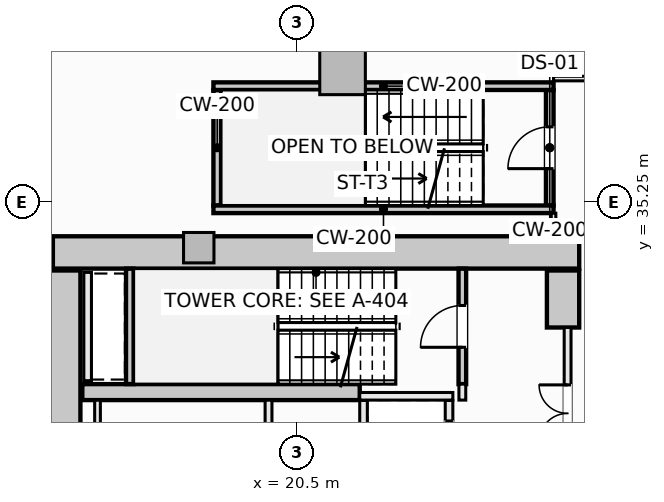
"""IFC4 building model, lengths in metres.
Left out: names, types, materials, properties, quantities, classifications, styles, units other than length and angle.
Written with IfcOpenShell. Run it as: python <this file> out.ifc"""

import sys

from ifc_helpers import new_model, si_unit, direction, frame, frame_2d, origin, origin_2d, place, context, subcontext, project, spatial, rectangle, extrude, element, fill, save


model = new_model("IFC4")
c1 = context("Model", 3, precision=1e-05, world=origin(), true_north=direction((0.0, 1.0)))
c2 = subcontext(c1, "Body", "Model", "MODEL_VIEW")
j1 = project(units=[si_unit("LENGTHUNIT", "METRE"), si_unit("PLANEANGLEUNIT", "RADIAN")], contexts=[c1])
p1 = place(None, origin())
s1 = spatial("IfcSite", under=j1, at=p1, CompositionType="ELEMENT")
p2 = place(p1, origin())
s2 = spatial("IfcBuilding", under=s1, at=p2, CompositionType="ELEMENT")
p3 = place(p2, frame((0.0, 0.0, 26.5)))
s3 = spatial("IfcBuildingStorey", under=s2, at=p3, CompositionType="ELEMENT", Elevation=26.5)
p4 = place(p3, frame((14.075, 33.925, -0.28), z_axis=(0.0, 0.0, 1.0), x_axis=(1.0, 0.0, 0.0)))
e1 = element("IfcWall", 1, at=p4, inside=s3, PredefinedType="SHEAR", context=c2, shape_type="SweptSolid", body=[
    extrude(rectangle(XDim=13.85, YDim=0.85, at=frame_2d((6.925, 0.0))), origin(), (0.0, 0.0, 1.0), 3.85),
])
p5 = place(p3, frame((14.375, 20.55, -0.28), z_axis=(0.0, 0.0, 1.0), x_axis=(0.0, 1.0, 0.0)))
e2 = element("IfcWall", 2, at=p5, inside=s3, PredefinedType="SHEAR", context=c2, shape_type="SweptSolid", body=[
    extrude(rectangle(XDim=12.9, YDim=0.85, at=frame_2d((6.45, 0.0))), origin(), (0.0, 0.0, 1.0), 3.85),
])
p6 = place(p3, frame((27.5, 31.95, -0.28), z_axis=(0.0, 0.0, 1.0), x_axis=(0.0, 1.0, 0.0)))
e3 = element("IfcWall", 3, at=p6, inside=s3, PredefinedType="SHEAR", context=c2, shape_type="SweptSolid", body=[
    extrude(rectangle(XDim=1.5, YDim=0.85, at=frame_2d((0.75, 0.0))), origin(), (0.0, 0.0, 1.0), 3.85),
])
p7 = place(p3, frame((14.85, 30.25, -0.28), z_axis=(0.0, 0.0, 1.0), x_axis=(1.0, 0.0, 0.0)))
e4 = element("IfcWall", 4, at=p7, inside=s3, PredefinedType="SHEAR", context=c2, shape_type="SweptSolid", body=[
    extrude(rectangle(XDim=7.3, YDim=0.42, at=frame_2d((3.65, 0.0))), origin(), (0.0, 0.0, 1.0), 3.85),
])
p8 = place(p3, frame((21.698, 38.677, -0.28), z_axis=(0.0, 0.0, 1.0), x_axis=(1.0, 0.0, 0.0)))
e5 = element("IfcColumn", 5, at=p8, inside=s3, PredefinedType="COLUMN", context=c2, shape_type="SweptSolid", body=[
    extrude(rectangle(XDim=1.2, YDim=1.2, at=origin_2d()), origin(), (0.0, 0.0, 1.0), 3.85),
])
p9 = place(p3, frame((17.914, 34.05, -0.28), z_axis=(0.0, 0.0, 1.0), x_axis=(1.0, 0.0, 0.0)))
e6 = element("IfcColumn", 6, at=p9, inside=s3, PredefinedType="PILASTER", context=c2, shape_type="SweptSolid", body=[
    extrude(rectangle(XDim=0.8, YDim=0.8, at=origin_2d()), origin(), (0.0, 0.0, 1.0), 3.85),
])
p10 = place(p3, frame((24.85, 30.46, -0.28), z_axis=(0.0, 0.0, 1.0), x_axis=(0.0, 1.0, 0.0)))
e7 = element("IfcWall", 7, at=p10, inside=s3, PredefinedType="SHEAR", context=c2, shape_type="SweptSolid", body=[
    extrude(rectangle(XDim=3.038, YDim=0.2, at=frame_2d((1.519, 0.0))), origin(), (0.0, 0.0, 1.0), 3.85),
])
p11 = place(p10, frame((0.969, 0.0, 0.28)))
e8 = element("IfcOpeningElement", 8, at=p11, cuts=e7, PredefinedType="OPENING", context=c2, shape_type="SweptSolid", body=[
    extrude(rectangle(XDim=1.1, YDim=2.15, at=frame_2d((0.55, 1.075))), frame((0.0, 0.11, 0.0), z_axis=(0.0, -1.0, 0.0), x_axis=(1.0, 0.0, 0.0)), (0.0, 0.0, 1.0), 0.22),
])
p12 = place(p3, frame((16.1, 30.462, -0.28), z_axis=(0.0, 0.0, 1.0), x_axis=(0.0, 1.0, 0.0)))
e9 = element("IfcWall", 9, at=p12, inside=s3, PredefinedType="SHEAR", context=c2, shape_type="SweptSolid", body=[
    extrude(rectangle(XDim=3.036, YDim=0.2, at=frame_2d((1.518, 0.0))), origin(), (0.0, 0.0, 1.0), 3.85),
])
p13 = place(p3, frame((27.15, 35.16, -0.28), z_axis=(0.0, 0.0, 1.0), x_axis=(0.0, 1.0, 0.0)))
e10 = element("IfcWall", 10, at=p13, inside=s3, PredefinedType="SHEAR", context=c2, shape_type="SweptSolid", body=[
    extrude(rectangle(XDim=3.04, YDim=0.2, at=frame_2d((1.52, 0.0))), origin(), (0.0, 0.0, 1.0), 3.85),
])
p14 = place(p13, frame((0.97, 0.0, 0.28)))
e11 = element("IfcOpeningElement", 11, at=p14, cuts=e10, PredefinedType="OPENING", context=c2, shape_type="SweptSolid", body=[
    extrude(rectangle(XDim=1.1, YDim=2.15, at=frame_2d((0.55, 1.075))), frame((0.0, 0.11, 0.0), z_axis=(0.0, -1.0, 0.0), x_axis=(1.0, 0.0, 0.0)), (0.0, 0.0, 1.0), 0.22),
])
p15 = place(p3, frame((18.4, 35.16, -0.28), z_axis=(0.0, 0.0, 1.0), x_axis=(0.0, 1.0, 0.0)))
e12 = element("IfcWall", 12, at=p15, inside=s3, PredefinedType="SHEAR", context=c2, shape_type="SweptSolid", body=[
    extrude(rectangle(XDim=3.04, YDim=0.2, at=frame_2d((1.52, 0.0))), origin(), (0.0, 0.0, 1.0), 3.85),
])
for number, where, z_axis, x_axis in (
    (13, (18.3, 38.3, -0.28), (0.0, 0.0, 1.0), (1.0, 0.0, 0.0)),
    (14, (18.3, 35.06, -0.28), (0.0, 0.0, 1.0), (1.0, 0.0, 0.0)),
):
    element("IfcWall", number, at=place(p3, frame(where, z_axis=z_axis, x_axis=x_axis)), inside=s3, PredefinedType="SHEAR", context=c2, shape_type="SweptSolid", body=[
        extrude(rectangle(XDim=8.95, YDim=0.2, at=frame_2d((4.475, 0.0))), origin(), (0.0, 0.0, 1.0), 3.85),
    ])
p16 = place(p3, frame((22.15, 30.14, 0.0), z_axis=(0.0, 0.0, 1.0), x_axis=(1.0, 0.0, 0.0)))
e15 = element("IfcWall", 15, at=p16, inside=s3, PredefinedType="SOLIDWALL", context=c2, shape_type="SweptSolid", body=[
    extrude(rectangle(XDim=2.45, YDim=0.2, at=frame_2d((1.225, 0.0))), origin(), (0.0, 0.0, 1.0), 3.57),
])
p17 = place(p3, frame((22.25, 27.85, 0.0), z_axis=(0.0, 0.0, 1.0), x_axis=(0.0, 1.0, 0.0)))
e16 = element("IfcWall", 16, at=p17, inside=s3, PredefinedType="SOLIDWALL", context=c2, shape_type="SweptSolid", body=[
    extrude(rectangle(XDim=2.18, YDim=0.2, at=frame_2d((1.09, 0.0))), origin(), (0.0, 0.0, 1.0), 3.57),
])
p18 = place(p3, frame((24.5, 27.85, 0.0), z_axis=(0.0, 0.0, 1.0), x_axis=(0.0, 1.0, 0.0)))
e17 = element("IfcWall", 17, at=p18, inside=s3, PredefinedType="SOLIDWALL", context=c2, shape_type="SweptSolid", body=[
    extrude(rectangle(XDim=2.18, YDim=0.2, at=frame_2d((1.09, 0.0))), origin(), (0.0, 0.0, 1.0), 3.57),
])
p19 = place(p18, frame((0.54, 0.0, 0.0)))
e18 = element("IfcOpeningElement", 18, at=p19, cuts=e17, PredefinedType="OPENING", context=c2, shape_type="SweptSolid", body=[
    extrude(rectangle(XDim=1.1, YDim=2.2, at=frame_2d((0.55, 1.1))), frame((0.0, 0.11, 0.0), z_axis=(0.0, -1.0, 0.0), x_axis=(1.0, 0.0, 0.0)), (0.0, 0.0, 1.0), 0.22),
])
p20 = place(p3, frame((14.99, 30.55, 0.0), z_axis=(0.0, 0.0, 1.0), x_axis=(0.0, 1.0, 0.0)))
e19 = element("IfcWall", 19, at=p20, inside=s3, PredefinedType="SOLIDWALL", context=c2, shape_type="SweptSolid", body=[
    extrude(rectangle(XDim=2.85, YDim=0.2, at=frame_2d((1.425, 0.0))), origin(), (0.0, 0.0, 1.0), 3.57),
])
p21 = place(p3, frame((24.85, 30.04, 0.0), z_axis=(0.0, 0.0, 1.0), x_axis=(0.0, 1.0, 0.0)))
e20 = element("IfcWall", 20, at=p21, inside=s3, PredefinedType="SOLIDWALL", context=c2, shape_type="SweptSolid", body=[
    extrude(rectangle(XDim=0.42, YDim=0.18, at=frame_2d((0.21, 0.0))), origin(), (0.0, 0.0, 1.0), 3.57),
])
p22 = place(p3, frame((27.62, 22.05, 0.0), z_axis=(0.0, 0.0, 1.0), x_axis=(0.0, 1.0, 0.0)))
e21 = element("IfcWall", 21, at=p22, inside=s3, PredefinedType="SOLIDWALL", context=c2, shape_type="SweptSolid", body=[
    extrude(rectangle(XDim=9.9, YDim=0.18, at=frame_2d((4.95, 0.0))), origin(), (0.0, 0.0, 1.0), 2.662),
])
p23 = place(p22, frame((4.475, 0.0, 0.0)))
e22 = element("IfcOpeningElement", 22, at=p23, cuts=e21, PredefinedType="OPENING", context=c2, shape_type="SweptSolid", body=[
    extrude(rectangle(XDim=0.95, YDim=2.1, at=frame_2d((0.475, 1.05))), frame((0.0, 0.1, 0.0), z_axis=(0.0, -1.0, 0.0), x_axis=(1.0, 0.0, 0.0)), (0.0, 0.0, 1.0), 0.2),
])
p24 = place(p22, frame((6.89, 0.0, 0.0)))
e23 = element("IfcOpeningElement", 23, at=p24, cuts=e21, PredefinedType="OPENING", context=c2, shape_type="SweptSolid", body=[
    extrude(rectangle(XDim=1.5, YDim=2.2, at=frame_2d((0.75, 1.1))), frame((0.0, 0.1, 0.0), z_axis=(0.0, -1.0, 0.0), x_axis=(1.0, 0.0, 0.0)), (0.0, 0.0, 1.0), 0.2),
])
p25 = place(p22, frame((1.51, 0.0, 0.0)))
e24 = element("IfcOpeningElement", 24, at=p25, cuts=e21, PredefinedType="OPENING", context=c2, shape_type="SweptSolid", body=[
    extrude(rectangle(XDim=1.5, YDim=2.2, at=frame_2d((0.75, 1.1))), frame((0.0, 0.1, 0.0), z_axis=(0.0, -1.0, 0.0), x_axis=(1.0, 0.0, 0.0)), (0.0, 0.0, 1.0), 0.2),
])
p26 = place(p3, frame((15.25, 27.932, 0.0), z_axis=(0.0, 0.0, 1.0), x_axis=(0.0, 1.0, 0.0)))
e25 = element("IfcWall", 25, at=p26, inside=s3, PredefinedType="PARTITIONING", context=c2, shape_type="SweptSolid", body=[
    extrude(rectangle(XDim=2.106, YDim=0.15, at=frame_2d((1.053, 0.0))), origin(), (0.0, 0.0, 1.0), 3.57),
])
p27 = place(p3, frame((19.75, 27.932, 0.0), z_axis=(0.0, 0.0, 1.0), x_axis=(0.0, 1.0, 0.0)))
e26 = element("IfcWall", 26, at=p27, inside=s3, PredefinedType="SOLIDWALL", context=c2, shape_type="SweptSolid", body=[
    extrude(rectangle(XDim=2.106, YDim=0.18, at=frame_2d((1.053, 0.0))), origin(), (0.0, 0.0, 1.0), 3.57),
])
p28 = place(p3, frame((27.25, 34.352, 0.0), z_axis=(0.0, 0.0, 1.0), x_axis=(0.0, 1.0, 0.0)))
e27 = element("IfcWall", 27, at=p28, inside=s3, PredefinedType="PARTITIONING", context=c2, shape_type="SweptSolid", body=[
    extrude(rectangle(XDim=0.606, YDim=0.12, at=frame_2d((0.303, 0.0))), origin(), (0.0, 0.0, 1.0), 3.57),
])
p29 = place(p3, frame((27.25, 38.5, 0.0), z_axis=(0.0, 0.0, 1.0), x_axis=(1.0, 0.0, 0.0)))
e28 = element("IfcWall", 28, at=p29, inside=s3, PredefinedType="PARTITIONING", context=c2, shape_type="SweptSolid", body=[
    extrude(rectangle(XDim=2.53, YDim=0.12, at=frame_2d((1.265, 0.0))), origin(), (0.0, 0.0, 1.0), 3.57),
])
p30 = place(p11, origin())
e29 = element("IfcDoor", 29, at=p30, inside=s3, OperationType="SINGLE_SWING_LEFT", PredefinedType="DOOR", context=c2, shape_type="SweptSolid", body=[
    extrude(rectangle(XDim=1.1, YDim=2.15, at=frame_2d((0.55, 1.075))), frame((0.0, 0.025, 0.0), z_axis=(0.0, -1.0, 0.0), x_axis=(1.0, 0.0, 0.0)), (0.0, 0.0, 1.0), 0.05),
])
fill(e8, e29)
p31 = place(p14, origin())
e30 = element("IfcDoor", 30, at=p31, inside=s3, OperationType="SINGLE_SWING_LEFT", PredefinedType="DOOR", context=c2, shape_type="SweptSolid", body=[
    extrude(rectangle(XDim=1.1, YDim=2.15, at=frame_2d((0.55, 1.075))), frame((0.0, 0.025, 0.0), z_axis=(0.0, -1.0, 0.0), x_axis=(1.0, 0.0, 0.0)), (0.0, 0.0, 1.0), 0.05),
])
fill(e11, e30)
p32 = place(p19, origin())
e31 = element("IfcDoor", 31, at=p32, inside=s3, OperationType="SLIDING_TO_LEFT", PredefinedType="DOOR", context=c2, shape_type="SweptSolid", body=[
    extrude(rectangle(XDim=1.1, YDim=2.2, at=frame_2d((0.55, 1.1))), frame((0.0, 0.025, 0.0), z_axis=(0.0, -1.0, 0.0), x_axis=(1.0, 0.0, 0.0)), (0.0, 0.0, 1.0), 0.05),
])
fill(e18, e31)
p33 = place(p24, origin())
e32 = element("IfcDoor", 32, at=p33, inside=s3, OperationType="DOUBLE_DOOR_SINGLE_SWING", PredefinedType="DOOR", context=c2, shape_type="SweptSolid", body=[
    extrude(rectangle(XDim=1.5, YDim=2.2, at=frame_2d((0.75, 1.1))), frame((0.0, 0.025, 0.0), z_axis=(0.0, -1.0, 0.0), x_axis=(1.0, 0.0, 0.0)), (0.0, 0.0, 1.0), 0.05),
])
fill(e23, e32)
save(model, sys.argv[1])
